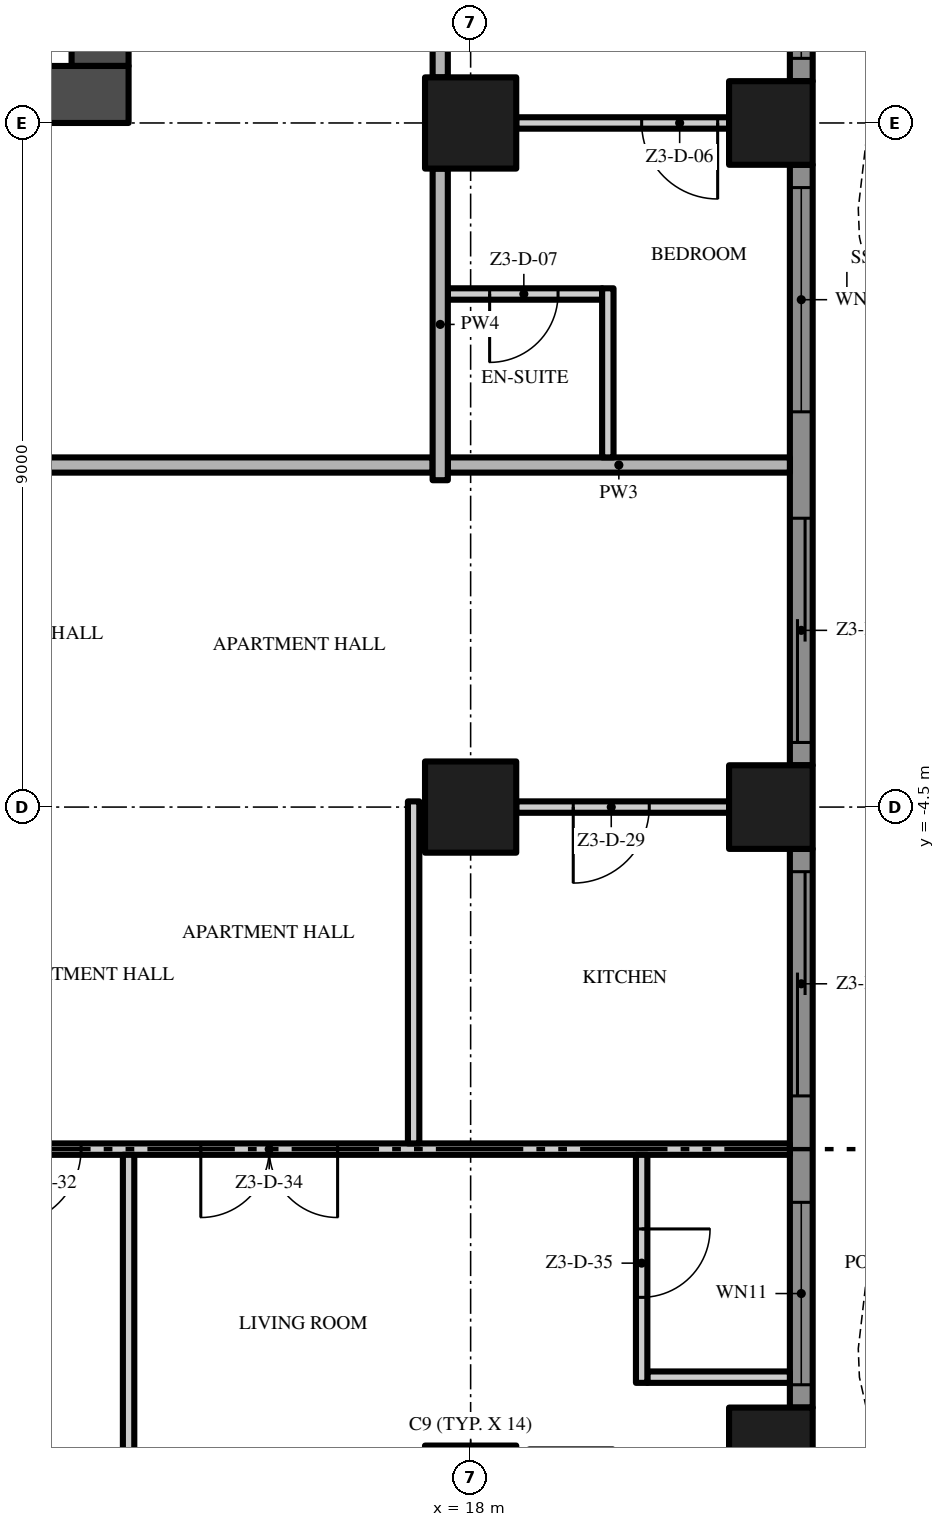
"""IFC4 building model, lengths in metres.
Left out: names, types, materials, properties, quantities, classifications, styles, units other than length and angle.
Written with IfcOpenShell. Run it as: python <this file> out.ifc"""

import sys

from ifc_helpers import new_model, si_unit, direction, frame, frame_2d, origin, origin_2d, place, context, subcontext, project, spatial, polyline, rectangle, outline, extrude, element, fill, save


model = new_model("IFC4")
c1 = context("Model", 3, precision=1e-05, world=origin(), true_north=direction((0.0, 1.0)))
c2 = subcontext(c1, "Body", "Model", "MODEL_VIEW")
j1 = project(units=[si_unit("LENGTHUNIT", "METRE"), si_unit("PLANEANGLEUNIT", "RADIAN")], contexts=[c1])
p1 = place(None, origin())
s1 = spatial("IfcSite", under=j1, at=p1, CompositionType="ELEMENT")
p2 = place(p1, origin())
s2 = spatial("IfcBuilding", under=s1, at=p2, CompositionType="ELEMENT")
p3 = place(p2, frame((0.0, 0.0, 163.0)))
s3 = spatial("IfcBuildingStorey", under=s2, at=p3, CompositionType="ELEMENT", Elevation=163.0)
p4 = place(p3, frame((-13.5, 4.875, -0.3), z_axis=(0.0, 0.0, 1.0), x_axis=(1.0, 0.0, 0.0)))
e1 = element("IfcWall", 1, at=p4, inside=s3, PredefinedType="SHEAR", context=c2, shape_type="SweptSolid", body=[
    extrude(rectangle(XDim=27.0, YDim=0.75, at=frame_2d((13.5, 0.0))), origin(), (0.0, 0.0, 1.0), 3.8),
])
p5 = place(p4, frame((12.0, 0.0, 0.3)))
e2 = element("IfcOpeningElement", 2, at=p5, cuts=e1, PredefinedType="OPENING", context=c2, shape_type="SweptSolid", body=[
    extrude(rectangle(XDim=3.0, YDim=2.4, at=frame_2d((1.5, 1.2))), frame((0.0, 0.385, 0.0), z_axis=(0.0, -1.0, 0.0), x_axis=(1.0, 0.0, 0.0)), (0.0, 0.0, 1.0), 0.77),
])
p6 = place(p4, frame((4.9, 0.0, 0.3)))
e3 = element("IfcOpeningElement", 3, at=p6, cuts=e1, PredefinedType="OPENING", context=c2, shape_type="SweptSolid", body=[
    extrude(rectangle(XDim=1.2, YDim=2.2, at=frame_2d((0.6, 1.1))), frame((0.0, 0.385, 0.0), z_axis=(0.0, -1.0, 0.0), x_axis=(1.0, 0.0, 0.0)), (0.0, 0.0, 1.0), 0.77),
])
p7 = place(p4, frame((20.75, 0.0, 0.3)))
e4 = element("IfcOpeningElement", 4, at=p7, cuts=e1, PredefinedType="OPENING", context=c2, shape_type="SweptSolid", body=[
    extrude(rectangle(XDim=1.5, YDim=2.2, at=frame_2d((0.75, 1.1))), frame((0.0, 0.385, 0.0), z_axis=(0.0, -1.0, 0.0), x_axis=(1.0, 0.0, 0.0)), (0.0, 0.0, 1.0), 0.77),
])
p8 = place(p4, frame((17.4, 0.0, 0.3)))
e5 = element("IfcOpeningElement", 5, at=p8, cuts=e1, PredefinedType="OPENING", context=c2, shape_type="SweptSolid", body=[
    extrude(rectangle(XDim=1.2, YDim=2.2, at=frame_2d((0.6, 1.1))), frame((0.0, 0.385, 0.0), z_axis=(0.0, -1.0, 0.0), x_axis=(1.0, 0.0, 0.0)), (0.0, 0.0, 1.0), 0.77),
])
p9 = place(p3, frame((13.125, 5.25, -0.3), z_axis=(0.0, 0.0, 1.0), x_axis=(0.0, 1.0, 0.0)))
e6 = element("IfcWall", 6, at=p9, inside=s3, PredefinedType="SHEAR", context=c2, shape_type="SweptSolid", body=[
    extrude(rectangle(XDim=16.5, YDim=0.75, at=frame_2d((8.25, 0.0))), origin(), (0.0, 0.0, 1.0), 3.8),
])
p10 = place(p9, frame((6.15, 0.0, 0.3)))
e7 = element("IfcOpeningElement", 7, at=p10, cuts=e6, PredefinedType="OPENING", context=c2, shape_type="SweptSolid", body=[
    extrude(rectangle(XDim=1.2, YDim=2.2, at=frame_2d((0.6, 1.1))), frame((0.0, 0.385, 0.0), z_axis=(0.0, -1.0, 0.0), x_axis=(1.0, 0.0, 0.0)), (0.0, 0.0, 1.0), 0.77),
])
for number, where, z_axis, x_axis in (
    (8, (18.0, -13.5, 0.0), (0.0, 0.0, 1.0), (1.0, 0.0, 0.0)),
    (9, (18.0, -4.5, 0.0), (0.0, 0.0, 1.0), (1.0, 0.0, 0.0)),
    (10, (18.0, 4.5, 0.0), (0.0, 0.0, 1.0), (1.0, 0.0, 0.0)),
):
    element("IfcColumn", number, at=place(p3, frame(where, z_axis=z_axis, x_axis=x_axis)), inside=s3, PredefinedType="COLUMN", context=c2, shape_type="SweptSolid", body=[
        extrude(rectangle(XDim=1.2, YDim=1.2, at=origin_2d()), origin(), (0.0, 0.0, 1.0), 3.5),
    ])
for number, where, z_axis, x_axis in (
    (11, (21.95, -12.95, 0.0), (0.0, 0.0, 1.0), (1.0, 0.0, 0.0)),
    (12, (21.95, -4.5, 0.0), (0.0, 0.0, 1.0), (1.0, 0.0, 0.0)),
    (13, (21.95, 4.5, 0.0), (0.0, 0.0, 1.0), (1.0, 0.0, 0.0)),
):
    element("IfcColumn", number, at=place(p3, frame(where, z_axis=z_axis, x_axis=x_axis)), inside=s3, PredefinedType="COLUMN", context=c2, shape_type="SweptSolid", body=[
        extrude(rectangle(XDim=1.1, YDim=1.1, at=origin_2d()), origin(), (0.0, 0.0, 1.0), 3.5),
    ])
p11 = place(p3, frame((22.35, -5.05, 0.0), z_axis=(0.0, 0.0, 1.0), x_axis=(0.0, -1.0, 0.0)))
e14 = element("IfcWall", 14, at=p11, inside=s3, PredefinedType="SOLIDWALL", context=c2, shape_type="SweptSolid", body=[
    extrude(rectangle(XDim=7.35, YDim=0.3, at=frame_2d((3.675, 0.0))), origin(), (0.0, 0.0, 1.0), 3.5),
])
p12 = place(p11, frame((4.65, 0.0, 0.45)))
e15 = element("IfcOpeningElement", 15, at=p12, cuts=e14, PredefinedType="OPENING", context=c2, shape_type="SweptSolid", body=[
    extrude(rectangle(XDim=2.4, YDim=2.65, at=frame_2d((1.2, 1.325))), frame((0.0, 0.16, 0.0), z_axis=(0.0, -1.0, 0.0), x_axis=(1.0, 0.0, 0.0)), (0.0, 0.0, 1.0), 0.32),
])
p13 = place(p11, frame((0.3, 0.0, 0.0)))
e16 = element("IfcOpeningElement", 16, at=p13, cuts=e14, PredefinedType="OPENING", context=c2, shape_type="SweptSolid", body=[
    extrude(rectangle(XDim=2.95, YDim=2.4, at=frame_2d((1.475, 1.2))), frame((0.0, 0.16, 0.0), z_axis=(0.0, -1.0, 0.0), x_axis=(1.0, 0.0, 0.0)), (0.0, 0.0, 1.0), 0.32),
])
p14 = place(p3, frame((22.35, 3.95, 0.0), z_axis=(0.0, 0.0, 1.0), x_axis=(0.0, -1.0, 0.0)))
e17 = element("IfcWall", 17, at=p14, inside=s3, PredefinedType="SOLIDWALL", context=c2, shape_type="SweptSolid", body=[
    extrude(rectangle(XDim=7.9, YDim=0.3, at=frame_2d((3.95, 0.0))), origin(), (0.0, 0.0, 1.0), 3.5),
])
p15 = place(p14, frame((4.65, 0.0, 0.0)))
e18 = element("IfcOpeningElement", 18, at=p15, cuts=e17, PredefinedType="OPENING", context=c2, shape_type="SweptSolid", body=[
    extrude(rectangle(XDim=2.95, YDim=2.4, at=frame_2d((1.475, 1.2))), frame((0.0, 0.16, 0.0), z_axis=(0.0, -1.0, 0.0), x_axis=(1.0, 0.0, 0.0)), (0.0, 0.0, 1.0), 0.32),
])
p16 = place(p14, frame((0.3, 0.0, 0.45)))
e19 = element("IfcOpeningElement", 19, at=p16, cuts=e17, PredefinedType="OPENING", context=c2, shape_type="SweptSolid", body=[
    extrude(rectangle(XDim=2.95, YDim=2.65, at=frame_2d((1.475, 1.325))), frame((0.0, 0.16, 0.0), z_axis=(0.0, -1.0, 0.0), x_axis=(1.0, 0.0, 0.0)), (0.0, 0.0, 1.0), 0.32),
])
p17 = place(p3, frame((22.35, 12.95, 0.0), z_axis=(0.0, 0.0, 1.0), x_axis=(0.0, -1.0, 0.0)))
e20 = element("IfcWall", 20, at=p17, inside=s3, PredefinedType="SOLIDWALL", context=c2, shape_type="SweptSolid", body=[
    extrude(rectangle(XDim=7.9, YDim=0.3, at=frame_2d((3.95, 0.0))), origin(), (0.0, 0.0, 1.0), 3.5),
])
p18 = place(p17, frame((4.65, 0.0, 0.45)))
e21 = element("IfcOpeningElement", 21, at=p18, cuts=e20, PredefinedType="OPENING", context=c2, shape_type="SweptSolid", body=[
    extrude(rectangle(XDim=2.95, YDim=2.65, at=frame_2d((1.475, 1.325))), frame((0.0, 0.16, 0.0), z_axis=(0.0, -1.0, 0.0), x_axis=(1.0, 0.0, 0.0)), (0.0, 0.0, 1.0), 0.32),
])
p19 = place(p17, frame((0.3, 0.0, 0.0)))
e22 = element("IfcOpeningElement", 22, at=p19, cuts=e20, PredefinedType="OPENING", context=c2, shape_type="SweptSolid", body=[
    extrude(rectangle(XDim=2.95, YDim=2.4, at=frame_2d((1.475, 1.2))), frame((0.0, 0.16, 0.0), z_axis=(0.0, -1.0, 0.0), x_axis=(1.0, 0.0, 0.0)), (0.0, 0.0, 1.0), 0.32),
])
p20 = place(p3, origin())
e23 = element("IfcWall", 23, at=p20, inside=s3, PredefinedType="USERDEFINED", context=c2, shape_type="SweptSolid", body=[
    extrude(outline(polyline([(23.451, -13.5), (23.115, -12.0), (23.1, -11.625), (23.231, -10.5), (23.755, -9.0), (24.488, -7.5), (25.149, -6.0), (25.485, -4.5), (25.5, -4.125), (25.369, -3.0), (24.845, -1.5), (24.112, 0.0), (23.451, 1.5), (23.115, 3.0), (23.1, 3.375), (23.231, 4.5), (23.755, 6.0), (24.488, 7.5), (25.149, 9.0), (25.485, 10.5), (25.5, 10.875), (25.369, 12.0), (24.845, 13.5), (24.112, 15.0), (23.451, 16.5), (23.115, 18.0), (22.871, 17.945), (23.213, 16.421), (23.885, 14.895), (24.614, 13.404), (25.124, 11.944), (25.249, 10.865), (25.236, 10.533), (24.91, 9.079), (24.261, 7.605), (23.524, 6.096), (22.986, 4.556), (22.849, 3.385), (22.866, 2.967), (23.213, 1.421), (23.885, -0.105), (24.614, -1.596), (25.124, -3.056), (25.249, -4.135), (25.236, -4.467), (24.91, -5.921), (24.261, -7.395), (23.524, -8.904), (22.986, -10.444), (22.849, -11.615), (22.866, -12.033), (23.208, -13.555), (23.451, -13.5)])), origin(), (0.0, 0.0, 1.0), 0.9),
])
p21 = place(p3, frame((20.325, -12.0, 0.0), z_axis=(0.0, 0.0, 1.0), x_axis=(1.0, 0.0, 0.0)))
e24 = element("IfcWall", 24, at=p21, inside=s3, PredefinedType="PARTITIONING", context=c2, shape_type="SweptSolid", body=[
    extrude(rectangle(XDim=1.875, YDim=0.15, at=frame_2d((0.938, 0.0))), origin(), (0.0, 0.0, 1.0), 3.5),
])
p22 = place(p3, frame((22.2, -9.0, 0.0), z_axis=(0.0, 0.0, 1.0), x_axis=(-1.0, 0.0, 0.0)))
e25 = element("IfcWall", 25, at=p22, inside=s3, PredefinedType="PARTITIONING", context=c2, shape_type="SweptSolid", body=[
    extrude(rectangle(XDim=10.875, YDim=0.15, at=frame_2d((5.438, 0.0))), origin(), (0.0, 0.0, 1.0), 3.5),
])
p23 = place(p22, frame((9.325, 0.0, 0.0)))
e26 = element("IfcOpeningElement", 26, at=p23, cuts=e25, PredefinedType="OPENING", context=c2, shape_type="SweptSolid", body=[
    extrude(rectangle(XDim=1.0, YDim=2.4, at=frame_2d((0.5, 1.2))), frame((0.0, 0.085, 0.0), z_axis=(0.0, -1.0, 0.0), x_axis=(1.0, 0.0, 0.0)), (0.0, 0.0, 1.0), 0.17),
])
p24 = place(p22, frame((5.95, 0.0, 0.0)))
e27 = element("IfcOpeningElement", 27, at=p24, cuts=e25, PredefinedType="OPENING", context=c2, shape_type="SweptSolid", body=[
    extrude(rectangle(XDim=1.8, YDim=2.4, at=frame_2d((0.9, 1.2))), frame((0.0, 0.085, 0.0), z_axis=(0.0, -1.0, 0.0), x_axis=(1.0, 0.0, 0.0)), (0.0, 0.0, 1.0), 0.17),
])
p25 = place(p3, frame((21.4, -4.5, 0.0), z_axis=(0.0, 0.0, 1.0), x_axis=(-1.0, 0.0, 0.0)))
e28 = element("IfcWall", 28, at=p25, inside=s3, PredefinedType="PARTITIONING", context=c2, shape_type="SweptSolid", body=[
    extrude(rectangle(XDim=2.8, YDim=0.15, at=frame_2d((1.4, 0.0))), origin(), (0.0, 0.0, 1.0), 3.5),
])
p26 = place(p25, frame((1.05, 0.0, 0.0)))
e29 = element("IfcOpeningElement", 29, at=p26, cuts=e28, PredefinedType="OPENING", context=c2, shape_type="SweptSolid", body=[
    extrude(rectangle(XDim=1.0, YDim=2.4, at=frame_2d((0.5, 1.2))), frame((0.0, 0.085, 0.0), z_axis=(0.0, -1.0, 0.0), x_axis=(1.0, 0.0, 0.0)), (0.0, 0.0, 1.0), 0.17),
])
p27 = place(p3, frame((17.5, 0.0, 0.0), z_axis=(0.0, 0.0, 1.0), x_axis=(-1.0, 0.0, 0.0)))
e30 = element("IfcWall", 30, at=p27, inside=s3, PredefinedType="PARTITIONING", context=c2, shape_type="SweptSolid", body=[
    extrude(rectangle(XDim=35.0, YDim=0.2, at=frame_2d((17.5, 0.0))), origin(), (0.0, 0.0, 1.0), 3.5),
])
p28 = place(p27, frame((23.5, 0.0, 0.0)))
e31 = element("IfcOpeningElement", 31, at=p28, cuts=e30, PredefinedType="OPENING", context=c2, shape_type="SweptSolid", body=[
    extrude(rectangle(XDim=1.5, YDim=2.4, at=frame_2d((0.75, 1.2))), frame((0.0, 0.11, 0.0), z_axis=(0.0, -1.0, 0.0), x_axis=(1.0, 0.0, 0.0)), (0.0, 0.0, 1.0), 0.22),
])
p29 = place(p27, frame((5.5, 0.0, 0.0)))
e32 = element("IfcOpeningElement", 32, at=p29, cuts=e30, PredefinedType="OPENING", context=c2, shape_type="SweptSolid", body=[
    extrude(rectangle(XDim=1.5, YDim=2.4, at=frame_2d((0.75, 1.2))), frame((0.0, 0.11, 0.0), z_axis=(0.0, -1.0, 0.0), x_axis=(1.0, 0.0, 0.0)), (0.0, 0.0, 1.0), 0.22),
])
p30 = place(p3, frame((17.7, 0.0, 0.0), z_axis=(0.0, 0.0, 1.0), x_axis=(1.0, 0.0, 0.0)))
e33 = element("IfcWall", 33, at=p30, inside=s3, PredefinedType="PARTITIONING", context=c2, shape_type="SweptSolid", body=[
    extrude(rectangle(XDim=4.5, YDim=0.2, at=frame_2d((2.25, 0.0))), origin(), (0.0, 0.0, 1.0), 3.5),
])
p31 = place(p3, frame((19.73, 2.25, 0.0), z_axis=(0.0, 0.0, 1.0), x_axis=(-1.0, 0.0, 0.0)))
e34 = element("IfcWall", 34, at=p31, inside=s3, PredefinedType="PARTITIONING", context=c2, shape_type="SweptSolid", body=[
    extrude(rectangle(XDim=2.03, YDim=0.15, at=frame_2d((1.015, 0.0))), origin(), (0.0, 0.0, 1.0), 3.5),
])
p32 = place(p31, frame((0.58, 0.0, 0.0)))
e35 = element("IfcOpeningElement", 35, at=p32, cuts=e34, PredefinedType="OPENING", context=c2, shape_type="SweptSolid", body=[
    extrude(rectangle(XDim=0.9, YDim=2.1, at=frame_2d((0.45, 1.05))), frame((0.0, 0.085, 0.0), z_axis=(0.0, -1.0, 0.0), x_axis=(1.0, 0.0, 0.0)), (0.0, 0.0, 1.0), 0.17),
])
p33 = place(p3, frame((21.4, 4.5, 0.0), z_axis=(0.0, 0.0, 1.0), x_axis=(-1.0, 0.0, 0.0)))
e36 = element("IfcWall", 36, at=p33, inside=s3, PredefinedType="PARTITIONING", context=c2, shape_type="SweptSolid", body=[
    extrude(rectangle(XDim=2.8, YDim=0.15, at=frame_2d((1.4, 0.0))), origin(), (0.0, 0.0, 1.0), 3.5),
])
p34 = place(p33, frame((0.15, 0.0, 0.0)))
e37 = element("IfcOpeningElement", 37, at=p34, cuts=e36, PredefinedType="OPENING", context=c2, shape_type="SweptSolid", body=[
    extrude(rectangle(XDim=1.0, YDim=2.4, at=frame_2d((0.5, 1.2))), frame((0.0, 0.085, 0.0), z_axis=(0.0, -1.0, 0.0), x_axis=(1.0, 0.0, 0.0)), (0.0, 0.0, 1.0), 0.17),
])
p35 = place(p3, frame((13.5, -17.7, 0.0), z_axis=(0.0, 0.0, 1.0), x_axis=(0.0, 1.0, 0.0)))
e38 = element("IfcWall", 38, at=p35, inside=s3, PredefinedType="PARTITIONING", context=c2, shape_type="SweptSolid", body=[
    extrude(rectangle(XDim=8.625, YDim=0.15, at=frame_2d((4.312, 0.0))), origin(), (0.0, 0.0, 1.0), 3.5),
])
p36 = place(p3, frame((17.25, -8.925, 0.0), z_axis=(0.0, 0.0, 1.0), x_axis=(0.0, 1.0, 0.0)))
e39 = element("IfcWall", 39, at=p36, inside=s3, PredefinedType="PARTITIONING", context=c2, shape_type="SweptSolid", body=[
    extrude(rectangle(XDim=4.5, YDim=0.15, at=frame_2d((2.25, 0.0))), origin(), (0.0, 0.0, 1.0), 3.5),
])
p37 = place(p3, frame((17.6, -0.2, 0.0), z_axis=(0.0, 0.0, 1.0), x_axis=(0.0, 1.0, 0.0)))
e40 = element("IfcWall", 40, at=p37, inside=s3, PredefinedType="PARTITIONING", context=c2, shape_type="SweptSolid", body=[
    extrude(rectangle(XDim=4.1, YDim=0.2, at=frame_2d((2.05, 0.0))), origin(), (0.0, 0.0, 1.0), 3.5),
])
p38 = place(p3, frame((17.6, 12.9, 0.0), z_axis=(0.0, 0.0, 1.0), x_axis=(0.0, -1.0, 0.0)))
e41 = element("IfcWall", 41, at=p38, inside=s3, PredefinedType="PARTITIONING", context=c2, shape_type="SweptSolid", body=[
    extrude(rectangle(XDim=7.8, YDim=0.2, at=frame_2d((3.9, 0.0))), origin(), (0.0, 0.0, 1.0), 3.5),
])
p39 = place(p38, frame((5.55, 0.0, 0.0)))
e42 = element("IfcOpeningElement", 42, at=p39, cuts=e41, PredefinedType="OPENING", context=c2, shape_type="SweptSolid", body=[
    extrude(rectangle(XDim=1.2, YDim=2.4, at=frame_2d((0.6, 1.2))), frame((0.0, 0.11, 0.0), z_axis=(0.0, -1.0, 0.0), x_axis=(1.0, 0.0, 0.0)), (0.0, 0.0, 1.0), 0.22),
])
p40 = place(p3, frame((19.805, 0.1, 0.0), z_axis=(0.0, 0.0, 1.0), x_axis=(0.0, 1.0, 0.0)))
e43 = element("IfcWall", 43, at=p40, inside=s3, PredefinedType="PARTITIONING", context=c2, shape_type="SweptSolid", body=[
    extrude(rectangle(XDim=2.225, YDim=0.15, at=frame_2d((1.113, 0.0))), origin(), (0.0, 0.0, 1.0), 3.5),
])
p41 = place(p3, frame((20.25, -9.075, 0.0), z_axis=(0.0, 0.0, 1.0), x_axis=(0.0, -1.0, 0.0)))
e44 = element("IfcWall", 44, at=p41, inside=s3, PredefinedType="PARTITIONING", context=c2, shape_type="SweptSolid", body=[
    extrude(rectangle(XDim=3.0, YDim=0.15, at=frame_2d((1.5, 0.0))), origin(), (0.0, 0.0, 1.0), 3.5),
])
p42 = place(p41, frame((0.975, 0.0, 0.0)))
e45 = element("IfcOpeningElement", 45, at=p42, cuts=e44, PredefinedType="OPENING", context=c2, shape_type="SweptSolid", body=[
    extrude(rectangle(XDim=0.9, YDim=2.1, at=frame_2d((0.45, 1.05))), frame((0.0, 0.085, 0.0), z_axis=(0.0, -1.0, 0.0), x_axis=(1.0, 0.0, 0.0)), (0.0, 0.0, 1.0), 0.17),
])
p43 = place(p12, origin())
e46 = element("IfcWindow", 46, at=p43, inside=s3, PartitioningType="SINGLE_PANEL", PredefinedType="WINDOW", context=c2, shape_type="SweptSolid", body=[
    extrude(rectangle(XDim=2.4, YDim=2.65, at=frame_2d((1.2, 1.325))), frame((0.0, 0.03, 0.0), z_axis=(0.0, -1.0, 0.0), x_axis=(1.0, 0.0, 0.0)), (0.0, 0.0, 1.0), 0.06),
])
fill(e15, e46)
p44 = place(p13, origin())
e47 = element("IfcDoor", 47, at=p44, inside=s3, OperationType="SINGLE_SWING_LEFT", PredefinedType="DOOR", context=c2, shape_type="SweptSolid", body=[
    extrude(rectangle(XDim=2.95, YDim=2.4, at=frame_2d((1.475, 1.2))), frame((0.0, 0.025, 0.0), z_axis=(0.0, -1.0, 0.0), x_axis=(1.0, 0.0, 0.0)), (0.0, 0.0, 1.0), 0.05),
])
fill(e16, e47)
p45 = place(p15, origin())
e48 = element("IfcDoor", 48, at=p45, inside=s3, OperationType="SINGLE_SWING_LEFT", PredefinedType="DOOR", context=c2, shape_type="SweptSolid", body=[
    extrude(rectangle(XDim=2.95, YDim=2.4, at=frame_2d((1.475, 1.2))), frame((0.0, 0.025, 0.0), z_axis=(0.0, -1.0, 0.0), x_axis=(1.0, 0.0, 0.0)), (0.0, 0.0, 1.0), 0.05),
])
fill(e18, e48)
p46 = place(p16, origin())
e49 = element("IfcWindow", 49, at=p46, inside=s3, PartitioningType="SINGLE_PANEL", PredefinedType="WINDOW", context=c2, shape_type="SweptSolid", body=[
    extrude(rectangle(XDim=2.95, YDim=2.65, at=frame_2d((1.475, 1.325))), frame((0.0, 0.03, 0.0), z_axis=(0.0, -1.0, 0.0), x_axis=(1.0, 0.0, 0.0)), (0.0, 0.0, 1.0), 0.06),
])
fill(e19, e49)
p47 = place(p18, origin())
e50 = element("IfcWindow", 50, at=p47, inside=s3, PartitioningType="SINGLE_PANEL", PredefinedType="WINDOW", context=c2, shape_type="SweptSolid", body=[
    extrude(rectangle(XDim=2.95, YDim=2.65, at=frame_2d((1.475, 1.325))), frame((0.0, 0.03, 0.0), z_axis=(0.0, -1.0, 0.0), x_axis=(1.0, 0.0, 0.0)), (0.0, 0.0, 1.0), 0.06),
])
fill(e21, e50)
p48 = place(p34, origin())
e51 = element("IfcDoor", 51, at=p48, inside=s3, OperationType="SINGLE_SWING_LEFT", PredefinedType="DOOR", context=c2, shape_type="SweptSolid", body=[
    extrude(rectangle(XDim=1.0, YDim=2.4, at=frame_2d((0.5, 1.2))), frame((0.0, 0.025, 0.0), z_axis=(0.0, -1.0, 0.0), x_axis=(1.0, 0.0, 0.0)), (0.0, 0.0, 1.0), 0.05),
])
fill(e37, e51)
p49 = place(p32, origin())
e52 = element("IfcDoor", 52, at=p49, inside=s3, OperationType="SINGLE_SWING_RIGHT", PredefinedType="DOOR", context=c2, shape_type="SweptSolid", body=[
    extrude(rectangle(XDim=0.9, YDim=2.1, at=frame_2d((0.45, 1.05))), frame((0.0, 0.025, 0.0), z_axis=(0.0, -1.0, 0.0), x_axis=(1.0, 0.0, 0.0)), (0.0, 0.0, 1.0), 0.05),
])
fill(e35, e52)
p50 = place(p26, origin())
e53 = element("IfcDoor", 53, at=p50, inside=s3, OperationType="SINGLE_SWING_RIGHT", PredefinedType="DOOR", context=c2, shape_type="SweptSolid", body=[
    extrude(rectangle(XDim=1.0, YDim=2.4, at=frame_2d((0.5, 1.2))), frame((0.0, 0.025, 0.0), z_axis=(0.0, -1.0, 0.0), x_axis=(1.0, 0.0, 0.0)), (0.0, 0.0, 1.0), 0.05),
])
fill(e29, e53)
p51 = place(p23, origin())
e54 = element("IfcDoor", 54, at=p51, inside=s3, OperationType="SINGLE_SWING_RIGHT", PredefinedType="DOOR", context=c2, shape_type="SweptSolid", body=[
    extrude(rectangle(XDim=1.0, YDim=2.4, at=frame_2d((0.5, 1.2))), frame((0.0, 0.025, 0.0), z_axis=(0.0, -1.0, 0.0), x_axis=(1.0, 0.0, 0.0)), (0.0, 0.0, 1.0), 0.05),
])
fill(e26, e54)
p52 = place(p24, origin())
e55 = element("IfcDoor", 55, at=p52, inside=s3, OperationType="DOUBLE_DOOR_SINGLE_SWING", PredefinedType="DOOR", context=c2, shape_type="SweptSolid", body=[
    extrude(rectangle(XDim=1.8, YDim=2.4, at=frame_2d((0.9, 1.2))), frame((0.0, 0.025, 0.0), z_axis=(0.0, -1.0, 0.0), x_axis=(1.0, 0.0, 0.0)), (0.0, 0.0, 1.0), 0.05),
])
fill(e27, e55)
p53 = place(p42, origin())
e56 = element("IfcDoor", 56, at=p53, inside=s3, OperationType="SINGLE_SWING_LEFT", PredefinedType="DOOR", context=c2, shape_type="SweptSolid", body=[
    extrude(rectangle(XDim=0.9, YDim=2.1, at=frame_2d((0.45, 1.05))), frame((0.0, 0.025, 0.0), z_axis=(0.0, -1.0, 0.0), x_axis=(1.0, 0.0, 0.0)), (0.0, 0.0, 1.0), 0.05),
])
fill(e45, e56)
save(model, sys.argv[1])
